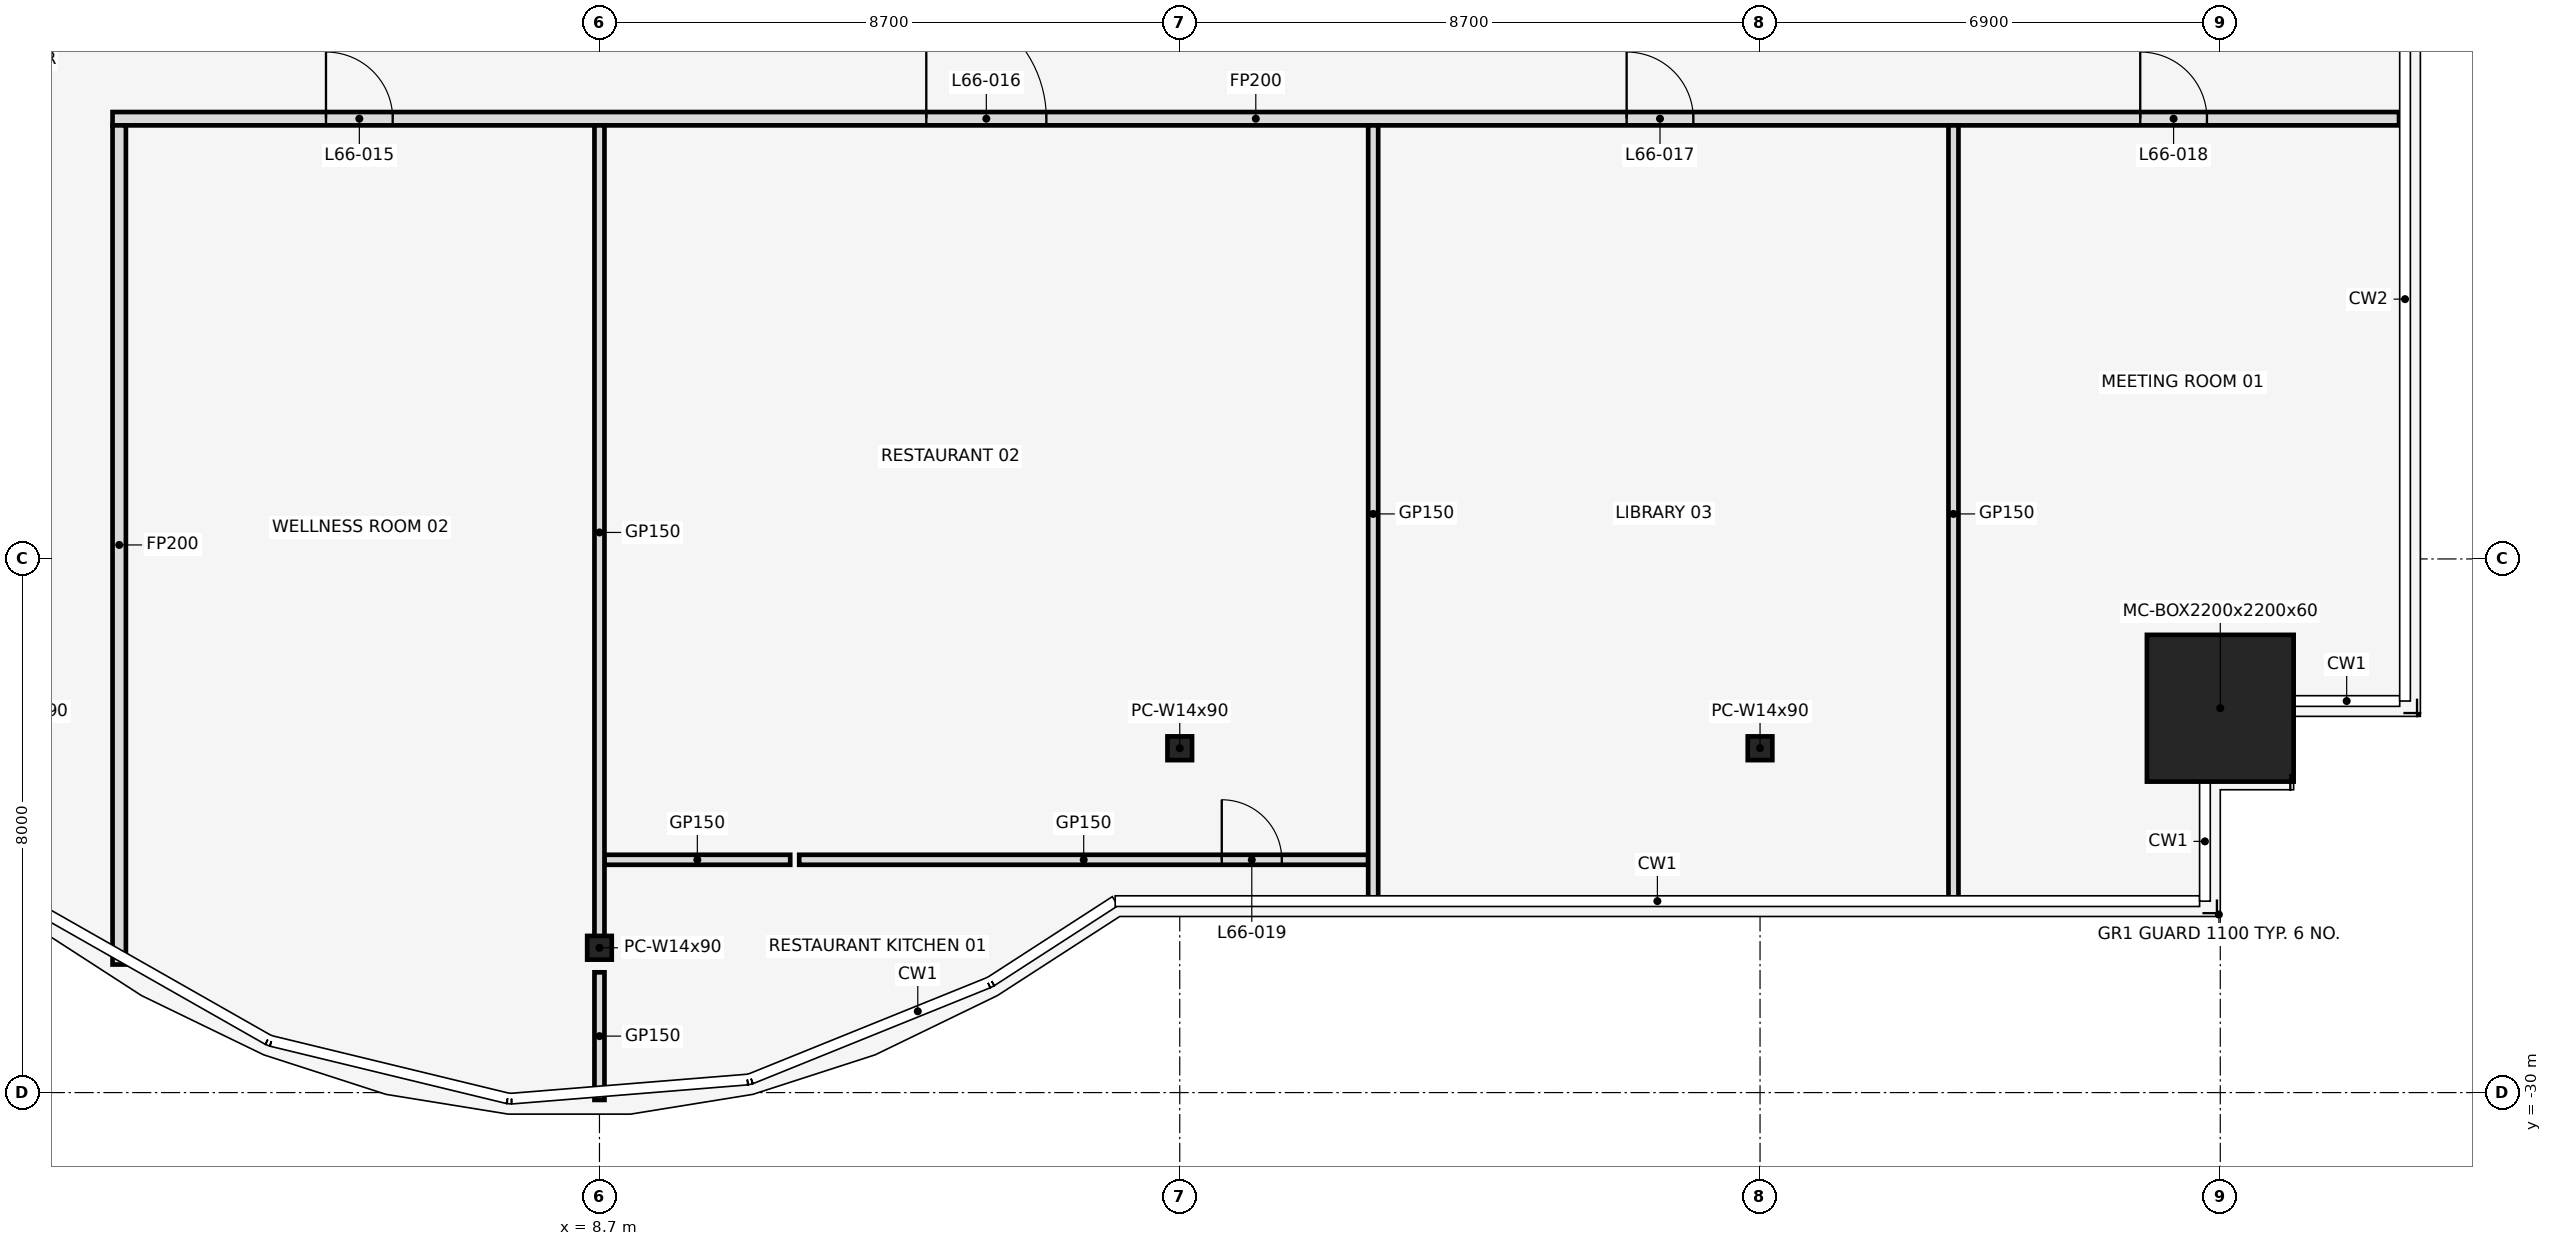
"""IFC4 building model, lengths in metres.
Left out: names, types, materials, properties, quantities, classifications, styles, units other than length and angle.
Written with IfcOpenShell. Run it as: python <this file> out.ifc"""

import sys

from ifc_helpers import new_model, si_unit, direction, frame, frame_2d, origin, origin_2d, place, context, subcontext, project, spatial, rectangle, hollow_rectangle, i_section, extrude, element, fill, save


model = new_model("IFC4")
c1 = context("Model", 3, precision=1e-05, world=origin(), true_north=direction((0.0, 1.0)))
c2 = subcontext(c1, "Body", "Model", "MODEL_VIEW")
j1 = project(units=[si_unit("LENGTHUNIT", "METRE"), si_unit("PLANEANGLEUNIT", "RADIAN")], contexts=[c1])
p1 = place(None, origin())
s1 = spatial("IfcSite", under=j1, at=p1, CompositionType="ELEMENT")
p2 = place(p1, origin())
s2 = spatial("IfcBuilding", under=s1, at=p2, CompositionType="ELEMENT")
p3 = place(p2, frame((0.0, 0.0, 293.0)))
s3 = spatial("IfcBuildingStorey", under=s2, at=p3, CompositionType="ELEMENT", Elevation=293.0)
for number, where, z_axis, x_axis in (
    (1, (8.7, -27.829, 0.0), (0.0, 0.0, 1.0), (1.0, 0.0, 0.0)),
    (2, (17.4, -24.838, 0.0), (0.0, 0.0, 1.0), (1.0, 0.0, 0.0)),
    (3, (26.1, -24.838, 0.0), (0.0, 0.0, 1.0), (1.0, 0.0, 0.0)),
):
    element("IfcColumn", number, at=place(p3, frame(where, z_axis=z_axis, x_axis=x_axis)), inside=s3, PredefinedType="COLUMN", context=c2, shape_type="SweptSolid", body=[
        extrude(i_section(OverallWidth=0.368, OverallDepth=0.356, WebThickness=0.011, FlangeThickness=0.018, at=origin_2d()), origin(), (0.0, 0.0, 1.0), 4.5),
    ])
p4 = place(p3, frame((33.0, -24.238, 0.0), z_axis=(0.0, 0.0, 1.0), x_axis=(1.0, 0.0, 0.0)))
e4 = element("IfcColumn", 4, at=p4, inside=s3, PredefinedType="COLUMN", context=c2, shape_type="SweptSolid", body=[
    extrude(hollow_rectangle(XDim=2.2, YDim=2.2, WallThickness=0.06, at=origin_2d()), origin(), (0.0, 0.0, 1.0), 4.5),
])
p5 = place(p3, frame((8.775, -26.51, 0.0), z_axis=(0.0, 0.0, 1.0), x_axis=(1.0, 0.0, 0.0)))
e5 = element("IfcWall", 5, at=p5, inside=s3, PredefinedType="PARTITIONING", context=c2, shape_type="SweptSolid", body=[
    extrude(rectangle(XDim=2.785, YDim=0.15, at=frame_2d((1.393, 0.0))), origin(), (0.0, 0.0, 1.0), 3.418),
])
p6 = place(p3, frame((11.695, -26.51, 0.0), z_axis=(0.0, 0.0, 1.0), x_axis=(1.0, 0.0, 0.0)))
e6 = element("IfcWall", 6, at=p6, inside=s3, PredefinedType="PARTITIONING", context=c2, shape_type="SweptSolid", body=[
    extrude(rectangle(XDim=8.53, YDim=0.15, at=frame_2d((4.265, 0.0))), origin(), (0.0, 0.0, 1.0), 3.418),
])
p7 = place(p6, frame((6.335, 0.0, 0.0)))
e7 = element("IfcOpeningElement", 7, at=p7, cuts=e6, PredefinedType="OPENING", context=c2, shape_type="SweptSolid", body=[
    extrude(rectangle(XDim=0.9, YDim=2.1, at=frame_2d((0.45, 1.05))), frame((0.0, 0.087, 0.0), z_axis=(0.0, -1.0, 0.0), x_axis=(1.0, 0.0, 0.0)), (0.0, 0.0, 1.0), 0.174),
])
p8 = place(p3, frame((1.4, -15.4, 0.0), z_axis=(0.0, 0.0, 1.0), x_axis=(1.0, 0.0, 0.0)))
e8 = element("IfcWall", 8, at=p8, inside=s3, PredefinedType="PARTITIONING", context=c2, shape_type="SweptSolid", body=[
    extrude(rectangle(XDim=34.28, YDim=0.2, at=frame_2d((17.14, 0.0))), origin(), (0.0, 0.0, 1.0), 3.418),
])
p9 = place(p8, frame((3.2, 0.0, 0.0)))
e9 = element("IfcOpeningElement", 9, at=p9, cuts=e8, PredefinedType="OPENING", context=c2, shape_type="SweptSolid", body=[
    extrude(rectangle(XDim=1.0, YDim=2.1, at=frame_2d((0.5, 1.05))), frame((0.0, 0.112, 0.0), z_axis=(0.0, -1.0, 0.0), x_axis=(1.0, 0.0, 0.0)), (0.0, 0.0, 1.0), 0.224),
])
p10 = place(p8, frame((12.2, 0.0, 0.0)))
e10 = element("IfcOpeningElement", 10, at=p10, cuts=e8, PredefinedType="OPENING", context=c2, shape_type="SweptSolid", body=[
    extrude(rectangle(XDim=1.8, YDim=2.1, at=frame_2d((0.9, 1.05))), frame((0.0, 0.112, 0.0), z_axis=(0.0, -1.0, 0.0), x_axis=(1.0, 0.0, 0.0)), (0.0, 0.0, 1.0), 0.224),
])
p11 = place(p8, frame((22.7, 0.0, 0.0)))
e11 = element("IfcOpeningElement", 11, at=p11, cuts=e8, PredefinedType="OPENING", context=c2, shape_type="SweptSolid", body=[
    extrude(rectangle(XDim=1.0, YDim=2.1, at=frame_2d((0.5, 1.05))), frame((0.0, 0.112, 0.0), z_axis=(0.0, -1.0, 0.0), x_axis=(1.0, 0.0, 0.0)), (0.0, 0.0, 1.0), 0.224),
])
p12 = place(p8, frame((30.4, 0.0, 0.0)))
e12 = element("IfcOpeningElement", 12, at=p12, cuts=e8, PredefinedType="OPENING", context=c2, shape_type="SweptSolid", body=[
    extrude(rectangle(XDim=1.0, YDim=2.1, at=frame_2d((0.5, 1.05))), frame((0.0, 0.112, 0.0), z_axis=(0.0, -1.0, 0.0), x_axis=(1.0, 0.0, 0.0)), (0.0, 0.0, 1.0), 0.224),
])
p13 = place(p3, frame((1.5, -28.08, 0.0), z_axis=(0.0, 0.0, 1.0), x_axis=(0.0, 1.0, 0.0)))
e13 = element("IfcWall", 13, at=p13, inside=s3, PredefinedType="PARTITIONING", context=c2, shape_type="SweptSolid", body=[
    extrude(rectangle(XDim=12.58, YDim=0.2, at=frame_2d((6.29, 0.0))), origin(), (0.0, 0.0, 1.0), 3.418),
])
p14 = place(p3, frame((8.7, -30.11, 0.0), z_axis=(0.0, 0.0, 1.0), x_axis=(0.0, 1.0, 0.0)))
e14 = element("IfcWall", 14, at=p14, inside=s3, PredefinedType="PARTITIONING", context=c2, shape_type="SweptSolid", body=[
    extrude(rectangle(XDim=1.913, YDim=0.15, at=frame_2d((0.957, 0.0))), origin(), (0.0, 0.0, 1.0), 3.418),
])
p15 = place(p3, frame((8.7, -27.705, 0.0), z_axis=(0.0, 0.0, 1.0), x_axis=(0.0, 1.0, 0.0)))
e15 = element("IfcWall", 15, at=p15, inside=s3, PredefinedType="PARTITIONING", context=c2, shape_type="SweptSolid", body=[
    extrude(rectangle(XDim=12.205, YDim=0.15, at=frame_2d((6.103, 0.0))), origin(), (0.0, 0.0, 1.0), 3.418),
])
for number, where, z_axis, x_axis in (
    (16, (20.3, -27.15, 0.0), (0.0, 0.0, 1.0), (0.0, 1.0, 0.0)),
    (17, (29.0, -27.15, 0.0), (0.0, 0.0, 1.0), (0.0, 1.0, 0.0)),
):
    element("IfcWall", number, at=place(p3, frame(where, z_axis=z_axis, x_axis=x_axis)), inside=s3, PredefinedType="PARTITIONING", context=c2, shape_type="SweptSolid", body=[
        extrude(rectangle(XDim=11.65, YDim=0.15, at=frame_2d((5.825, 0.0))), origin(), (0.0, 0.0, 1.0), 3.418),
    ])
p16 = place(p9, frame((1.0, 0.0, 0.0), z_axis=(0.0, 0.0, 1.0), x_axis=(-1.0, 0.0, 0.0)))
e18 = element("IfcDoor", 18, at=p16, inside=s3, OperationType="SINGLE_SWING_RIGHT", PredefinedType="DOOR", context=c2, shape_type="SweptSolid", body=[
    extrude(rectangle(XDim=1.0, YDim=2.1, at=frame_2d((0.5, 1.05))), frame((0.0, 0.025, 0.0), z_axis=(0.0, -1.0, 0.0), x_axis=(1.0, 0.0, 0.0)), (0.0, 0.0, 1.0), 0.05),
])
fill(e9, e18)
p17 = place(p10, origin())
e19 = element("IfcDoor", 19, at=p17, inside=s3, OperationType="SINGLE_SWING_LEFT", PredefinedType="DOOR", context=c2, shape_type="SweptSolid", body=[
    extrude(rectangle(XDim=1.8, YDim=2.1, at=frame_2d((0.9, 1.05))), frame((0.0, 0.025, 0.0), z_axis=(0.0, -1.0, 0.0), x_axis=(1.0, 0.0, 0.0)), (0.0, 0.0, 1.0), 0.05),
])
fill(e10, e19)
p18 = place(p11, frame((1.0, 0.0, 0.0), z_axis=(0.0, 0.0, 1.0), x_axis=(-1.0, 0.0, 0.0)))
e20 = element("IfcDoor", 20, at=p18, inside=s3, OperationType="SINGLE_SWING_RIGHT", PredefinedType="DOOR", context=c2, shape_type="SweptSolid", body=[
    extrude(rectangle(XDim=1.0, YDim=2.1, at=frame_2d((0.5, 1.05))), frame((0.0, 0.025, 0.0), z_axis=(0.0, -1.0, 0.0), x_axis=(1.0, 0.0, 0.0)), (0.0, 0.0, 1.0), 0.05),
])
fill(e11, e20)
p19 = place(p12, frame((1.0, 0.0, 0.0), z_axis=(0.0, 0.0, 1.0), x_axis=(-1.0, 0.0, 0.0)))
e21 = element("IfcDoor", 21, at=p19, inside=s3, OperationType="SINGLE_SWING_RIGHT", PredefinedType="DOOR", context=c2, shape_type="SweptSolid", body=[
    extrude(rectangle(XDim=1.0, YDim=2.1, at=frame_2d((0.5, 1.05))), frame((0.0, 0.025, 0.0), z_axis=(0.0, -1.0, 0.0), x_axis=(1.0, 0.0, 0.0)), (0.0, 0.0, 1.0), 0.05),
])
fill(e12, e21)
p20 = place(p7, frame((0.9, 0.0, 0.0), z_axis=(0.0, 0.0, 1.0), x_axis=(-1.0, 0.0, 0.0)))
e22 = element("IfcDoor", 22, at=p20, inside=s3, OperationType="SINGLE_SWING_LEFT", PredefinedType="DOOR", context=c2, shape_type="SweptSolid", body=[
    extrude(rectangle(XDim=0.9, YDim=2.1, at=frame_2d((0.45, 1.05))), frame((0.0, 0.025, 0.0), z_axis=(0.0, -1.0, 0.0), x_axis=(1.0, 0.0, 0.0)), (0.0, 0.0, 1.0), 0.05),
])
fill(e7, e22)
save(model, sys.argv[1])
